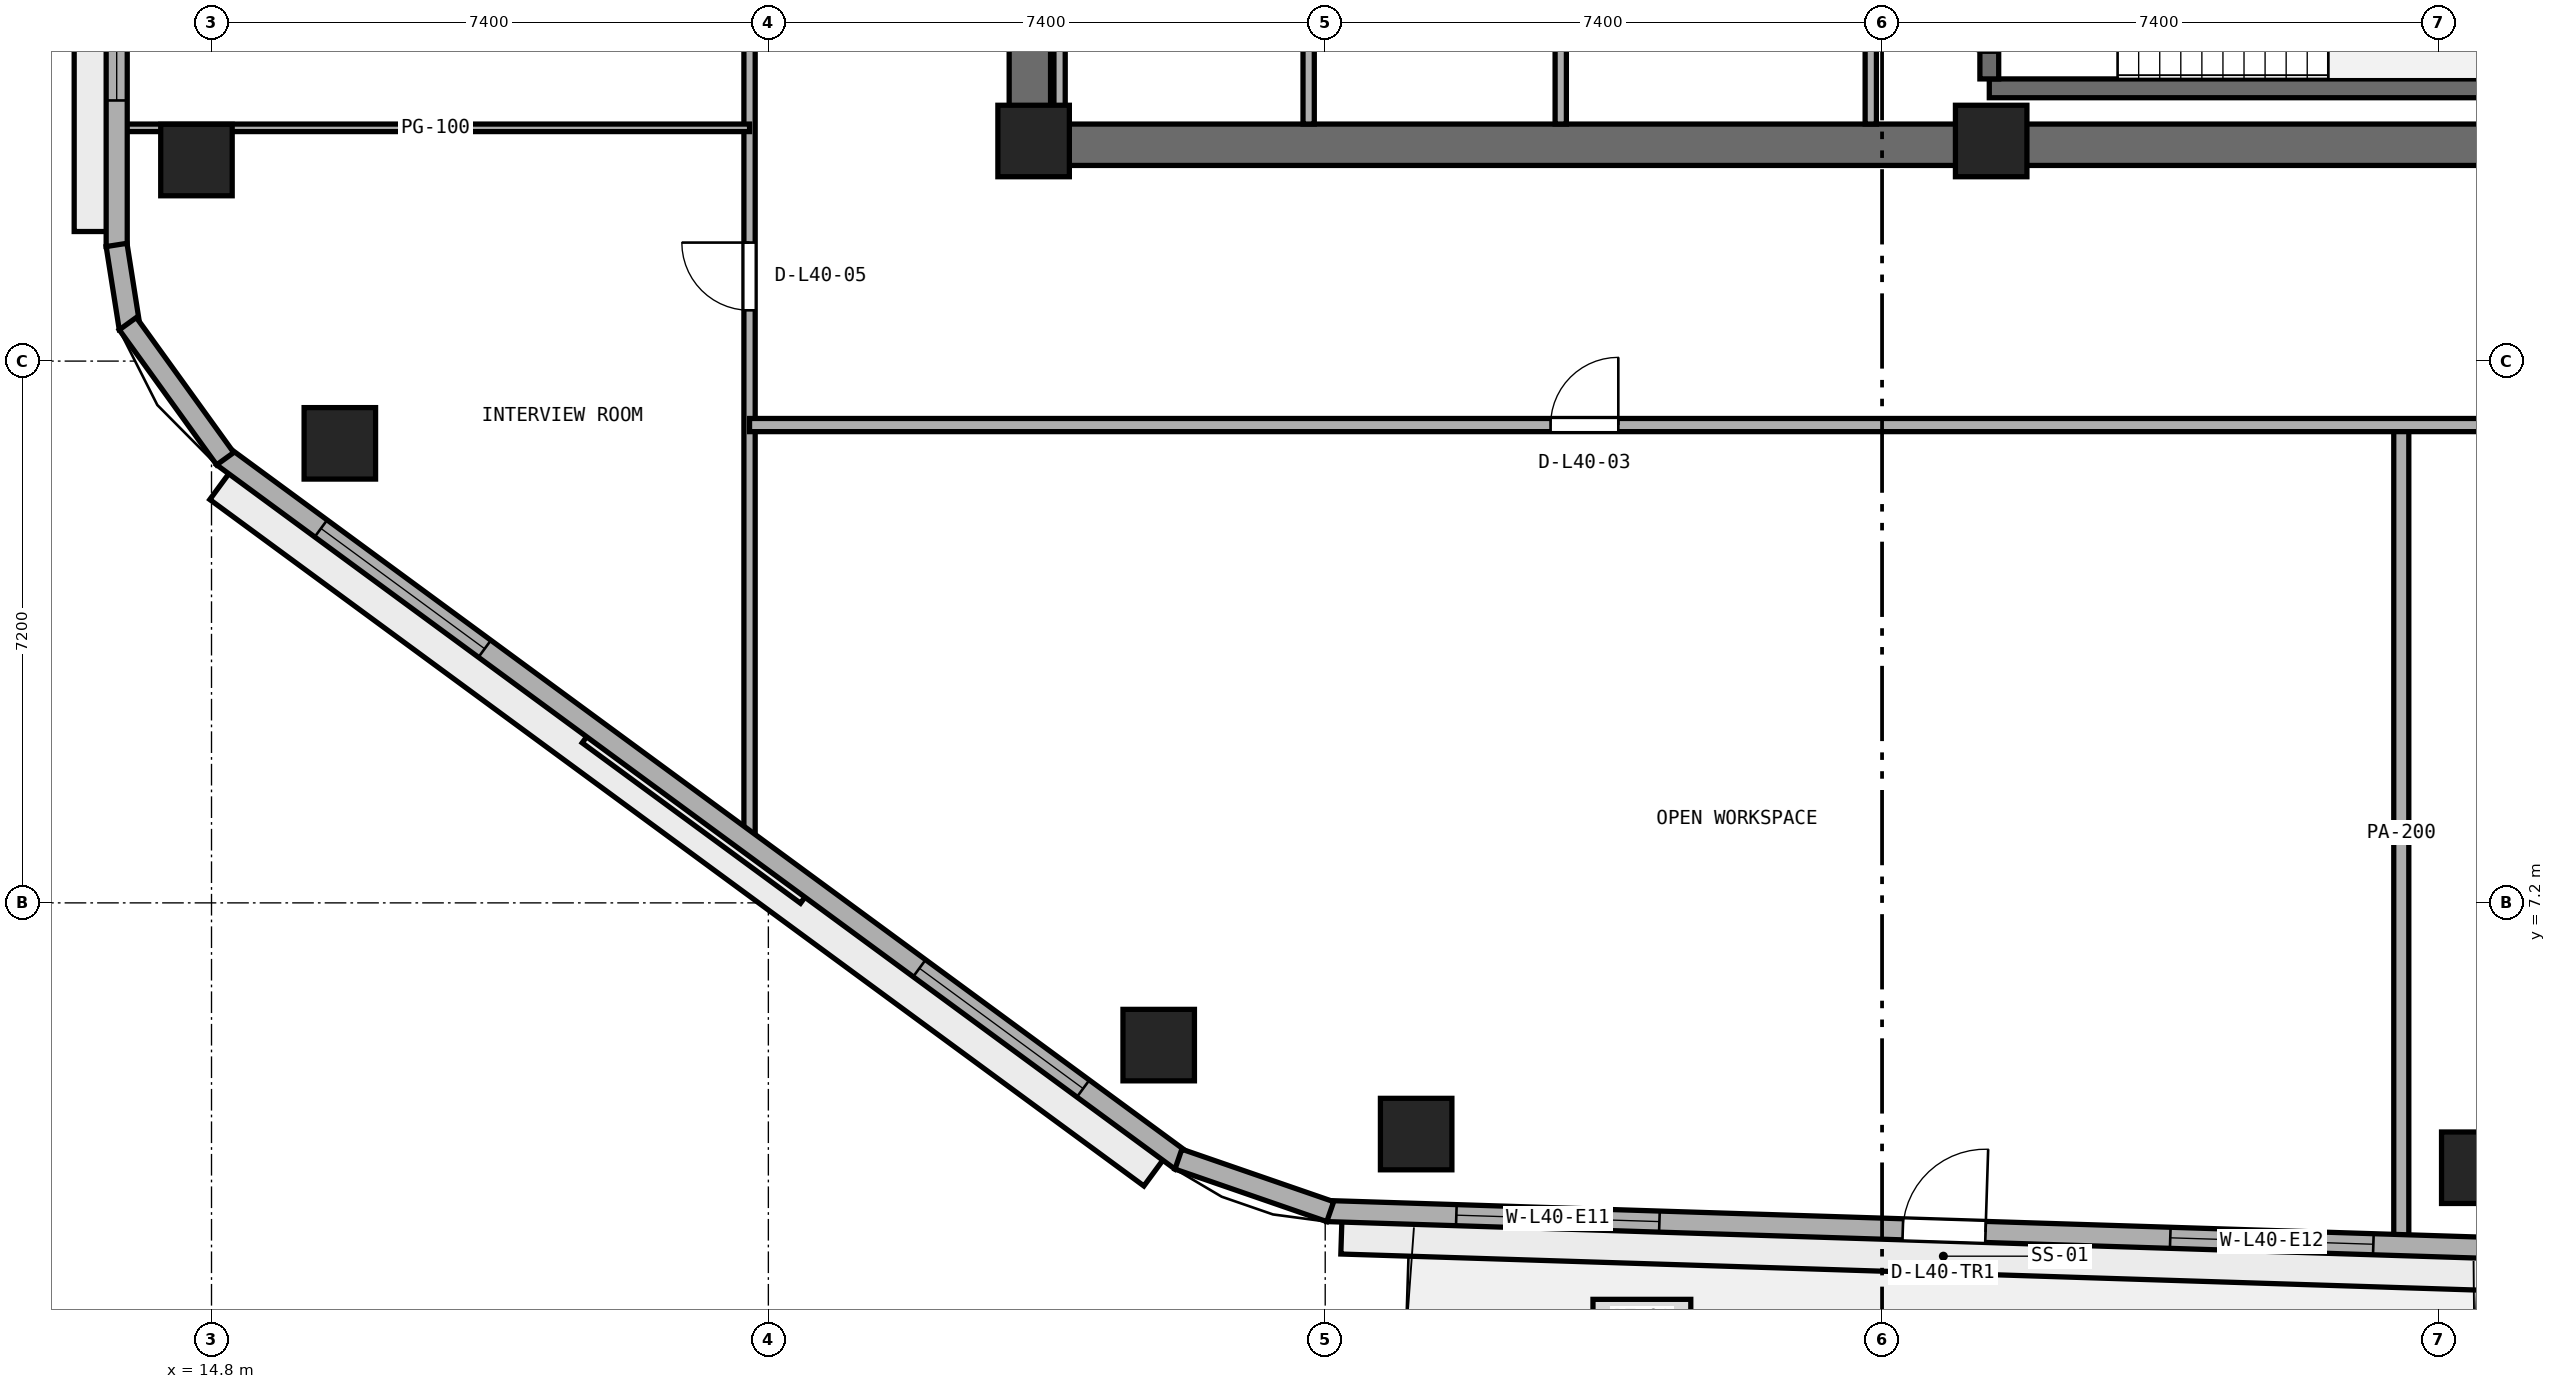
"""IFC4 building model, lengths in metres.
Left out: names, types, materials, properties, quantities, classifications, styles, units other than length and angle.
Written with IfcOpenShell. Run it as: python <this file> out.ifc"""

import sys

from ifc_helpers import new_model, si_unit, direction, frame, frame_2d, origin, origin_2d, place, context, subcontext, project, spatial, rectangle, extrude, element, fill, save


model = new_model("IFC4")
c1 = context("Model", 3, precision=1e-05, world=origin(), true_north=direction((0.0, 1.0)))
c2 = subcontext(c1, "Body", "Model", "MODEL_VIEW")
j1 = project(units=[si_unit("LENGTHUNIT", "METRE"), si_unit("PLANEANGLEUNIT", "RADIAN")], contexts=[c1])
p1 = place(None, origin())
s1 = spatial("IfcSite", under=j1, at=p1, CompositionType="ELEMENT")
p2 = place(p1, origin())
s2 = spatial("IfcBuilding", under=s1, at=p2, CompositionType="ELEMENT")
p3 = place(p2, frame((0.0, 0.0, 159.2)))
s3 = spatial("IfcBuildingStorey", under=s2, at=p3, CompositionType="ELEMENT", Elevation=159.2)
p4 = place(p3, frame((25.4, 17.275, 0.0), z_axis=(0.0, 0.0, 1.0), x_axis=(1.0, 0.0, 0.0)))
e1 = element("IfcWall", 1, at=p4, inside=s3, PredefinedType="SHEAR", context=c2, shape_type="SweptSolid", body=[
    extrude(rectangle(XDim=23.2, YDim=0.55, at=frame_2d((11.6, 0.0))), origin(), (0.0, 0.0, 1.0), 3.54),
])
p5 = place(p3, frame((25.675, 17.55, 0.0), z_axis=(0.0, 0.0, 1.0), x_axis=(0.0, 1.0, 0.0)))
e2 = element("IfcWall", 2, at=p5, inside=s3, PredefinedType="SHEAR", context=c2, shape_type="SweptSolid", body=[
    extrude(rectangle(XDim=15.3, YDim=0.55, at=frame_2d((7.65, 0.0))), origin(), (0.0, 0.0, 1.0), 3.54),
])
p6 = place(p5, frame((6.9, 0.0, 0.0)))
e3 = element("IfcOpeningElement", 3, at=p6, cuts=e2, PredefinedType="OPENING", context=c2, shape_type="SweptSolid", body=[
    extrude(rectangle(XDim=1.5, YDim=2.15, at=frame_2d((0.75, 1.075))), frame((0.0, 0.285, 0.0), z_axis=(0.0, -1.0, 0.0), x_axis=(1.0, 0.0, 0.0)), (0.0, 0.0, 1.0), 0.57),
])
for number, where, z_axis, x_axis in (
    (4, (25.725, 17.325, 0.0), (0.0, 0.0, 1.0), (1.0, 0.0, 0.0)),
    (5, (38.45, 17.325, 0.0), (0.0, 0.0, 1.0), (1.0, 0.0, 0.0)),
):
    element("IfcColumn", number, at=place(p3, frame(where, z_axis=z_axis, x_axis=x_axis)), inside=s3, PredefinedType="PILASTER", context=c2, shape_type="SweptSolid", body=[
        extrude(rectangle(XDim=0.95, YDim=0.95, at=origin_2d()), origin(), (0.0, 0.0, 1.0), 3.8),
    ])
for number, where, z_axis, x_axis in (
    (6, (30.809, 4.127, 0.0), (0.0, 0.0, 1.0), (1.0, 0.0, 0.0)),
    (7, (44.91, 3.68, 0.0), (0.0, 0.0, 1.0), (1.0, 0.0, 0.0)),
    (8, (14.6, 17.072, 0.0), (0.0, 0.0, 1.0), (1.0, 0.0, 0.0)),
    (9, (16.505, 13.307, 0.0), (0.0, 0.0, 1.0), (1.0, 0.0, 0.0)),
    (10, (27.387, 5.31, 0.0), (0.0, 0.0, 1.0), (1.0, 0.0, 0.0)),
):
    element("IfcColumn", number, at=place(p3, frame(where, z_axis=z_axis, x_axis=x_axis)), inside=s3, PredefinedType="COLUMN", context=c2, shape_type="SweptSolid", body=[
        extrude(rectangle(XDim=0.95, YDim=0.95, at=origin_2d()), origin(), (0.0, 0.0, 1.0), 3.8),
    ])
p7 = place(p3, frame((38.425, 18.025, 0.0), z_axis=(0.0, 0.0, 1.0), x_axis=(1.0, 0.0, 0.0)))
e11 = element("IfcWall", 11, at=p7, inside=s3, PredefinedType="SHEAR", context=c2, shape_type="SweptSolid", body=[
    extrude(rectangle(XDim=7.3, YDim=0.25, at=frame_2d((3.65, 0.0))), origin(), (0.0, 0.0, 1.0), 3.54),
])
p8 = place(p3, frame((38.425, 18.15, 0.0), z_axis=(0.0, 0.0, 1.0), x_axis=(0.0, 1.0, 0.0)))
e12 = element("IfcWall", 12, at=p8, inside=s3, PredefinedType="SHEAR", context=c2, shape_type="SweptSolid", body=[
    extrude(rectangle(XDim=3.2, YDim=0.25, at=frame_2d((1.6, 0.0))), origin(), (0.0, 0.0, 1.0), 3.54),
])
p9 = place(p8, frame((0.35, 0.0, 0.0)))
e13 = element("IfcOpeningElement", 13, at=p9, cuts=e12, PredefinedType="OPENING", context=c2, shape_type="SweptSolid", body=[
    extrude(rectangle(XDim=1.1, YDim=2.15, at=frame_2d((0.55, 1.075))), frame((0.0, 0.135, 0.0), z_axis=(0.0, -1.0, 0.0), x_axis=(1.0, 0.0, 0.0)), (0.0, 0.0, 1.0), 0.27),
])
p10 = place(p3, frame((26.07, 17.55, 0.0), z_axis=(0.0, 0.0, 1.0), x_axis=(0.0, 1.0, 0.0)))
e14 = element("IfcWall", 14, at=p10, inside=s3, PredefinedType="PARTITIONING", context=c2, shape_type="SweptSolid", body=[
    extrude(rectangle(XDim=2.2, YDim=0.15, at=frame_2d((1.1, 0.0))), origin(), (0.0, 0.0, 1.0), 2.64),
])
for number, where, z_axis, x_axis in (
    (15, (29.38, 17.55, 0.0), (0.0, 0.0, 1.0), (0.0, 1.0, 0.0)),
    (16, (32.73, 17.55, 0.0), (0.0, 0.0, 1.0), (0.0, 1.0, 0.0)),
    (17, (36.85, 17.55, 0.0), (0.0, 0.0, 1.0), (0.0, 1.0, 0.0)),
):
    element("IfcWall", number, at=place(p3, frame(where, z_axis=z_axis, x_axis=x_axis)), inside=s3, PredefinedType="PARTITIONING", context=c2, shape_type="SweptSolid", body=[
        extrude(rectangle(XDim=2.2, YDim=0.15, at=frame_2d((1.1, 0.0))), origin(), (0.0, 0.0, 1.0), 3.54),
    ])
p11 = place(p3, frame((43.9, 2.717, 0.0), z_axis=(0.0, 0.0, 1.0), x_axis=(0.0, 1.0, 0.0)))
e18 = element("IfcWall", 18, at=p11, inside=s3, PredefinedType="PARTITIONING", context=c2, shape_type="SweptSolid", body=[
    extrude(rectangle(XDim=10.833, YDim=0.2, at=frame_2d((5.417, 0.0))), origin(), (0.0, 0.0, 1.0), 3.54),
])
p12 = place(p3, frame((21.95, 7.957, 0.0), z_axis=(0.0, 0.0, 1.0), x_axis=(0.0, 1.0, 0.0)))
e19 = element("IfcWall", 19, at=p12, inside=s3, PredefinedType="PARTITIONING", context=c2, shape_type="SweptSolid", body=[
    extrude(rectangle(XDim=15.894, YDim=0.15, at=frame_2d((7.947, 0.0))), origin(), (0.0, 0.0, 1.0), 3.54),
])
p13 = place(p12, frame((7.118, 0.0, 0.0)))
e20 = element("IfcOpeningElement", 20, at=p13, cuts=e19, PredefinedType="OPENING", context=c2, shape_type="SweptSolid", body=[
    extrude(rectangle(XDim=0.9, YDim=2.1, at=frame_2d((0.45, 1.05))), frame((0.0, 0.085, 0.0), z_axis=(0.0, -1.0, 0.0), x_axis=(1.0, 0.0, 0.0)), (0.0, 0.0, 1.0), 0.17),
])
p14 = place(p3, frame((21.95, 13.55, 0.0), z_axis=(0.0, 0.0, 1.0), x_axis=(1.0, 0.0, 0.0)))
e21 = element("IfcWall", 21, at=p14, inside=s3, PredefinedType="PARTITIONING", context=c2, shape_type="SweptSolid", body=[
    extrude(rectangle(XDim=30.1, YDim=0.175, at=frame_2d((15.05, 0.0))), origin(), (0.0, 0.0, 1.0), 3.54),
])
p15 = place(p14, frame((10.645, 0.0, 0.0)))
e22 = element("IfcOpeningElement", 22, at=p15, cuts=e21, PredefinedType="OPENING", context=c2, shape_type="SweptSolid", body=[
    extrude(rectangle(XDim=0.9, YDim=2.1, at=frame_2d((0.45, 1.05))), frame((0.0, 0.097, 0.0), z_axis=(0.0, -1.0, 0.0), x_axis=(1.0, 0.0, 0.0)), (0.0, 0.0, 1.0), 0.195),
])
p16 = place(p14, frame((25.455, 0.0, 0.0)))
e23 = element("IfcOpeningElement", 23, at=p16, cuts=e21, PredefinedType="OPENING", context=c2, shape_type="SweptSolid", body=[
    extrude(rectangle(XDim=0.9, YDim=2.1, at=frame_2d((0.45, 1.05))), frame((0.0, 0.097, 0.0), z_axis=(0.0, -1.0, 0.0), x_axis=(1.0, 0.0, 0.0)), (0.0, 0.0, 1.0), 0.195),
])
p17 = place(p3, frame((13.605, 17.5, 0.0), z_axis=(0.0, 0.0, 1.0), x_axis=(1.0, 0.0, 0.0)))
e24 = element("IfcWall", 24, at=p17, inside=s3, PredefinedType="PARTITIONING", context=c2, shape_type="SweptSolid", body=[
    extrude(rectangle(XDim=8.345, YDim=0.1, at=frame_2d((4.172, 0.0))), origin(), (0.0, 0.0, 1.0), 2.923),
])
p18 = place(p3, frame((29.625, 3.104, 0.0), z_axis=(0.0, 0.0, 1.0), x_axis=(0.99949718661, -0.031707632487, 0.0)))
e25 = element("IfcWall", 25, at=p18, inside=s3, PredefinedType="STANDARD", context=c2, shape_type="SweptSolid", body=[
    extrude(rectangle(XDim=16.408, YDim=0.28, at=frame_2d((8.204, 0.0))), origin(), (0.0, 0.0, 1.0), 3.54),
])
p19 = place(p18, frame((7.654, 0.0, 0.0)))
e26 = element("IfcOpeningElement", 26, at=p19, cuts=e25, PredefinedType="OPENING", context=c2, shape_type="SweptSolid", body=[
    extrude(rectangle(XDim=1.1, YDim=2.2, at=frame_2d((0.55, 1.1))), frame((0.0, 0.15, 0.0), z_axis=(0.0, -1.0, 0.0), x_axis=(1.0, 0.0, 0.0)), (0.0, 0.0, 1.0), 0.3),
])
p20 = place(p18, frame((1.718, 0.0, 0.9)))
e27 = element("IfcOpeningElement", 27, at=p20, cuts=e25, PredefinedType="OPENING", context=c2, shape_type="SweptSolid", body=[
    extrude(rectangle(XDim=2.7, YDim=1.75, at=frame_2d((1.35, 0.875))), frame((0.0, 0.15, 0.0), z_axis=(0.0, -1.0, 0.0), x_axis=(1.0, 0.0, 0.0)), (0.0, 0.0, 1.0), 0.3),
])
p21 = place(p18, frame((11.21, 0.0, 0.9)))
e28 = element("IfcOpeningElement", 28, at=p21, cuts=e25, PredefinedType="OPENING", context=c2, shape_type="SweptSolid", body=[
    extrude(rectangle(XDim=2.7, YDim=1.75, at=frame_2d((1.35, 0.875))), frame((0.0, 0.15, 0.0), z_axis=(0.0, -1.0, 0.0), x_axis=(1.0, 0.0, 0.0)), (0.0, 0.0, 1.0), 0.3),
])
p22 = place(p3, frame((13.54, 33.673, 0.0), z_axis=(0.0, 0.0, 1.0), x_axis=(0.0, -1.0, 0.0)))
e29 = element("IfcWall", 29, at=p22, inside=s3, PredefinedType="STANDARD", context=c2, shape_type="SweptSolid", body=[
    extrude(rectangle(XDim=17.751, YDim=0.28, at=frame_2d((8.875, 0.0))), origin(), (0.0, 0.0, 1.0), 3.54),
])
p23 = place(p22, frame((13.109, 0.0, 0.9)))
e30 = element("IfcOpeningElement", 30, at=p23, cuts=e29, PredefinedType="OPENING", context=c2, shape_type="SweptSolid", body=[
    extrude(rectangle(XDim=2.7, YDim=1.75, at=frame_2d((1.35, 0.875))), frame((0.0, 0.15, 0.0), z_axis=(0.0, -1.0, 0.0), x_axis=(1.0, 0.0, 0.0)), (0.0, 0.0, 1.0), 0.3),
])
p24 = place(p3, frame((14.951, 13.134, 0.0), z_axis=(0.0, 0.0, 1.0), x_axis=(0.805804940328, -0.592181051827, 0.0)))
e31 = element("IfcWall", 31, at=p24, inside=s3, PredefinedType="STANDARD", context=c2, shape_type="SweptSolid", body=[
    extrude(rectangle(XDim=15.804, YDim=0.28, at=frame_2d((7.902, 0.0))), origin(), (0.0, 0.0, 1.0), 3.54),
])
p25 = place(p24, frame((1.617, 0.0, 0.9)))
e32 = element("IfcOpeningElement", 32, at=p25, cuts=e31, PredefinedType="OPENING", context=c2, shape_type="SweptSolid", body=[
    extrude(rectangle(XDim=2.7, YDim=1.75, at=frame_2d((1.35, 0.875))), frame((0.0, 0.15, 0.0), z_axis=(0.0, -1.0, 0.0), x_axis=(1.0, 0.0, 0.0)), (0.0, 0.0, 1.0), 0.3),
])
p26 = place(p24, frame((11.487, 0.0, 0.9)))
e33 = element("IfcOpeningElement", 33, at=p26, cuts=e31, PredefinedType="OPENING", context=c2, shape_type="SweptSolid", body=[
    extrude(rectangle(XDim=2.7, YDim=1.75, at=frame_2d((1.35, 0.875))), frame((0.0, 0.15, 0.0), z_axis=(0.0, -1.0, 0.0), x_axis=(1.0, 0.0, 0.0)), (0.0, 0.0, 1.0), 0.3),
])
p27 = place(p3, frame((13.538, 15.944, 0.0), z_axis=(0.0, 0.0, 1.0), x_axis=(0.155447556013, -0.987844146275, 0.0)))
e34 = element("IfcWall", 34, at=p27, inside=s3, PredefinedType="STANDARD", context=c2, shape_type="SweptSolid", body=[
    extrude(rectangle(XDim=1.12, YDim=0.28, at=frame_2d((0.56, 0.0))), origin(), (0.0, 0.0, 1.0), 3.54),
])
p28 = place(p3, frame((13.688, 14.898, 0.0), z_axis=(0.0, 0.0, 1.0), x_axis=(0.584833657716, -0.811153248655, 0.0)))
e35 = element("IfcWall", 35, at=p28, inside=s3, PredefinedType="STANDARD", context=c2, shape_type="SweptSolid", body=[
    extrude(rectangle(XDim=2.212, YDim=0.28, at=frame_2d((1.106, 0.0))), origin(), (0.0, 0.0, 1.0), 3.54),
])
p29 = place(p3, frame((27.649, 3.794, 0.0), z_axis=(0.0, 0.0, 1.0), x_axis=(0.945149124969, -0.326639145802, 0.0)))
e36 = element("IfcWall", 36, at=p29, inside=s3, PredefinedType="STANDARD", context=c2, shape_type="SweptSolid", body=[
    extrude(rectangle(XDim=2.135, YDim=0.28, at=frame_2d((1.067, 0.0))), origin(), (0.0, 0.0, 1.0), 3.54),
])
p30 = place(p15, origin())
e37 = element("IfcDoor", 37, at=p30, inside=s3, OperationType="SINGLE_SWING_RIGHT", PredefinedType="DOOR", context=c2, shape_type="SweptSolid", body=[
    extrude(rectangle(XDim=0.9, YDim=2.1, at=frame_2d((0.45, 1.05))), frame((0.0, 0.025, 0.0), z_axis=(0.0, -1.0, 0.0), x_axis=(1.0, 0.0, 0.0)), (0.0, 0.0, 1.0), 0.05),
])
fill(e22, e37)
p31 = place(p13, origin())
e38 = element("IfcDoor", 38, at=p31, inside=s3, OperationType="SINGLE_SWING_RIGHT", PredefinedType="DOOR", context=c2, shape_type="SweptSolid", body=[
    extrude(rectangle(XDim=0.9, YDim=2.1, at=frame_2d((0.45, 1.05))), frame((0.0, 0.025, 0.0), z_axis=(0.0, -1.0, 0.0), x_axis=(1.0, 0.0, 0.0)), (0.0, 0.0, 1.0), 0.05),
])
fill(e20, e38)
p32 = place(p19, origin())
e39 = element("IfcDoor", 39, at=p32, inside=s3, OperationType="SINGLE_SWING_RIGHT", PredefinedType="DOOR", context=c2, shape_type="SweptSolid", body=[
    extrude(rectangle(XDim=1.1, YDim=2.2, at=frame_2d((0.55, 1.1))), frame((0.0, 0.025, 0.0), z_axis=(0.0, -1.0, 0.0), x_axis=(1.0, 0.0, 0.0)), (0.0, 0.0, 1.0), 0.05),
])
fill(e26, e39)
p33 = place(p20, origin())
e40 = element("IfcWindow", 40, at=p33, inside=s3, PartitioningType="SINGLE_PANEL", PredefinedType="WINDOW", context=c2, shape_type="SweptSolid", body=[
    extrude(rectangle(XDim=2.7, YDim=1.75, at=frame_2d((1.35, 0.875))), frame((0.0, 0.03, 0.0), z_axis=(0.0, -1.0, 0.0), x_axis=(1.0, 0.0, 0.0)), (0.0, 0.0, 1.0), 0.06),
])
fill(e27, e40)
p34 = place(p21, origin())
e41 = element("IfcWindow", 41, at=p34, inside=s3, PartitioningType="SINGLE_PANEL", PredefinedType="WINDOW", context=c2, shape_type="SweptSolid", body=[
    extrude(rectangle(XDim=2.7, YDim=1.75, at=frame_2d((1.35, 0.875))), frame((0.0, 0.03, 0.0), z_axis=(0.0, -1.0, 0.0), x_axis=(1.0, 0.0, 0.0)), (0.0, 0.0, 1.0), 0.06),
])
fill(e28, e41)
p35 = place(p23, origin())
e42 = element("IfcWindow", 42, at=p35, inside=s3, PartitioningType="SINGLE_PANEL", PredefinedType="WINDOW", context=c2, shape_type="SweptSolid", body=[
    extrude(rectangle(XDim=2.7, YDim=1.75, at=frame_2d((1.35, 0.875))), frame((0.0, 0.03, 0.0), z_axis=(0.0, -1.0, 0.0), x_axis=(1.0, 0.0, 0.0)), (0.0, 0.0, 1.0), 0.06),
])
fill(e30, e42)
p36 = place(p25, origin())
e43 = element("IfcWindow", 43, at=p36, inside=s3, PartitioningType="SINGLE_PANEL", PredefinedType="WINDOW", context=c2, shape_type="SweptSolid", body=[
    extrude(rectangle(XDim=2.7, YDim=1.75, at=frame_2d((1.35, 0.875))), frame((0.0, 0.03, 0.0), z_axis=(0.0, -1.0, 0.0), x_axis=(1.0, 0.0, 0.0)), (0.0, 0.0, 1.0), 0.06),
])
fill(e32, e43)
p37 = place(p26, origin())
e44 = element("IfcWindow", 44, at=p37, inside=s3, PartitioningType="SINGLE_PANEL", PredefinedType="WINDOW", context=c2, shape_type="SweptSolid", body=[
    extrude(rectangle(XDim=2.7, YDim=1.75, at=frame_2d((1.35, 0.875))), frame((0.0, 0.03, 0.0), z_axis=(0.0, -1.0, 0.0), x_axis=(1.0, 0.0, 0.0)), (0.0, 0.0, 1.0), 0.06),
])
fill(e33, e44)
save(model, sys.argv[1])
